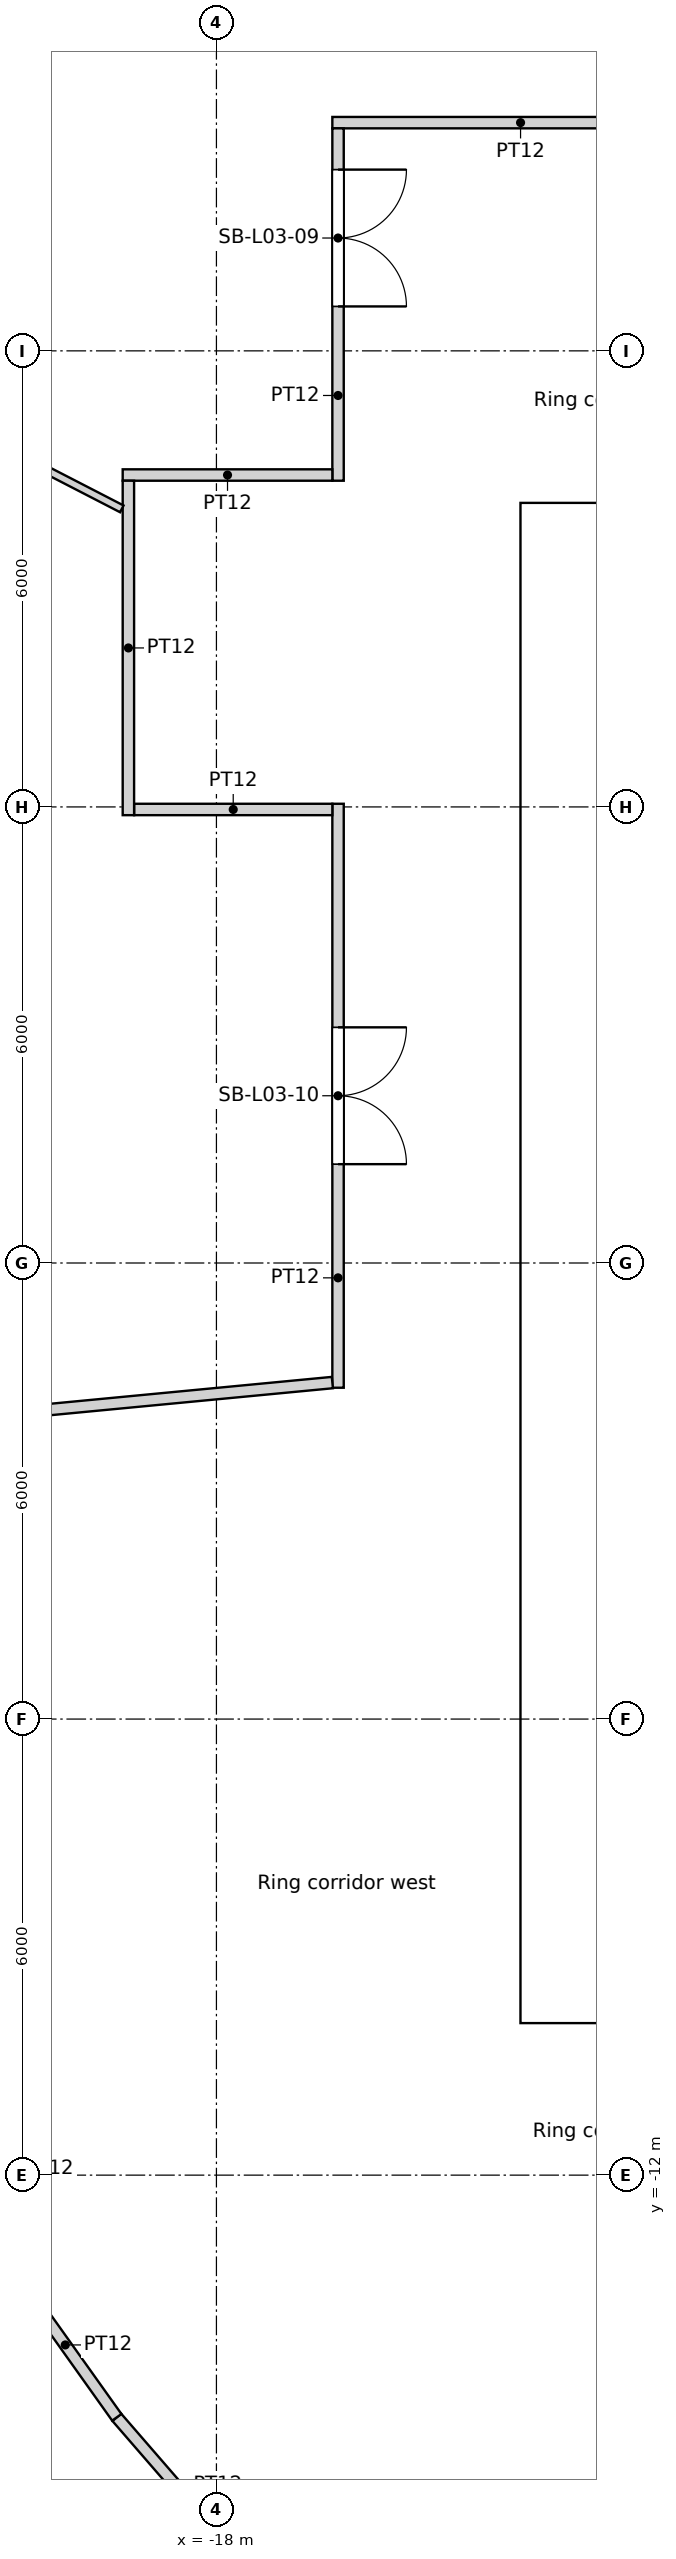
"""IFC4 building model, lengths in metres.
Left out: names, types, materials, properties, quantities, classifications, styles, units other than length and angle.
Written with IfcOpenShell. Run it as: python <this file> out.ifc"""

import sys

from ifc_helpers import new_model, si_unit, direction, frame, frame_2d, origin, origin_2d, place, context, subcontext, project, spatial, rectangle, circle, extrude, element, fill, save


model = new_model("IFC4")
c1 = context("Model", 3, precision=1e-05, world=origin(), true_north=direction((0.0, 1.0)))
c2 = subcontext(c1, "Body", "Model", "MODEL_VIEW")
j1 = project(units=[si_unit("LENGTHUNIT", "METRE"), si_unit("PLANEANGLEUNIT", "RADIAN")], contexts=[c1])
p1 = place(None, origin())
s1 = spatial("IfcSite", under=j1, at=p1, CompositionType="ELEMENT")
p2 = place(p1, origin())
s2 = spatial("IfcBuilding", under=s1, at=p2, CompositionType="ELEMENT")
p3 = place(p2, frame((0.0, 0.0, 18.6)))
s3 = spatial("IfcBuildingStorey", under=s2, at=p3, CompositionType="ELEMENT", Elevation=18.6)
for number, where, z_axis, x_axis in (
    (1, (-20.509, 13.489, 0.0), (0.0, 0.0, 1.0), (1.0, 0.0, 0.0)),
    (2, (-20.509, -13.489, 0.0), (0.0, 0.0, 1.0), (1.0, 0.0, 0.0)),
):
    element("IfcColumn", number, at=place(p3, frame(where, z_axis=z_axis, x_axis=x_axis)), inside=s3, PredefinedType="COLUMN", context=c2, shape_type="SweptSolid", body=[
        extrude(circle(Radius=0.75, at=origin_2d()), origin(), (0.0, 0.0, 1.0), 4.8),
    ])
for number, where, z_axis, x_axis in (
    (3, (-13.798, 12.802, 0.0), (0.0, 0.0, 1.0), (1.0, 0.0, 0.0)),
    (4, (-16.958, 8.167, 0.0), (0.0, 0.0, 1.0), (1.0, 0.0, 0.0)),
    (5, (-18.612, 2.805, 0.0), (0.0, 0.0, 1.0), (1.0, 0.0, 0.0)),
    (6, (-18.612, -2.805, 0.0), (0.0, 0.0, 1.0), (1.0, 0.0, 0.0)),
    (7, (-16.958, -8.167, 0.0), (0.0, 0.0, 1.0), (1.0, 0.0, 0.0)),
    (8, (-13.798, -12.802, 0.0), (0.0, 0.0, 1.0), (1.0, 0.0, 0.0)),
):
    element("IfcColumn", number, at=place(p3, frame(where, z_axis=z_axis, x_axis=x_axis)), inside=s3, PredefinedType="COLUMN", context=c2, shape_type="SweptSolid", body=[
        extrude(circle(Radius=0.8, at=origin_2d()), origin(), (0.0, 0.0, 1.0), 4.8),
    ])
p4 = place(p3, frame((-14.0, -9.4, 0.0), z_axis=(0.0, 0.0, 1.0), x_axis=(1.0, 0.0, 0.0)))
e9 = element("IfcWall", 9, at=p4, inside=s3, PredefinedType="SOLIDWALL", context=c2, shape_type="SweptSolid", body=[
    extrude(rectangle(XDim=28.0, YDim=1.2, at=frame_2d((14.0, 0.0))), origin(), (0.0, 0.0, 1.0), 4.8),
])
p5 = place(p4, frame((14.9, 0.0, 0.0)))
e10 = element("IfcOpeningElement", 10, at=p5, cuts=e9, PredefinedType="OPENING", context=c2, shape_type="SweptSolid", body=[
    extrude(rectangle(XDim=1.0, YDim=2.1, at=frame_2d((0.5, 1.05))), frame((0.0, 0.6, 0.0), z_axis=(0.0, -1.0, 0.0), x_axis=(1.0, 0.0, 0.0)), (0.0, 0.0, 1.0), 1.2),
])
p6 = place(p4, frame((9.8, 0.0, 0.0)))
e11 = element("IfcOpeningElement", 11, at=p6, cuts=e9, PredefinedType="OPENING", context=c2, shape_type="SweptSolid", body=[
    extrude(rectangle(XDim=1.8, YDim=2.1, at=frame_2d((0.9, 1.05))), frame((0.0, 0.6, 0.0), z_axis=(0.0, -1.0, 0.0), x_axis=(1.0, 0.0, 0.0)), (0.0, 0.0, 1.0), 1.2),
])
p7 = place(p4, frame((16.4, 0.0, 0.0)))
e12 = element("IfcOpeningElement", 12, at=p7, cuts=e9, PredefinedType="OPENING", context=c2, shape_type="SweptSolid", body=[
    extrude(rectangle(XDim=1.8, YDim=2.1, at=frame_2d((0.9, 1.05))), frame((0.0, 0.6, 0.0), z_axis=(0.0, -1.0, 0.0), x_axis=(1.0, 0.0, 0.0)), (0.0, 0.0, 1.0), 1.2),
])
p8 = place(p3, frame((-14.0, 9.4, 0.0), z_axis=(0.0, 0.0, 1.0), x_axis=(1.0, 0.0, 0.0)))
e13 = element("IfcWall", 13, at=p8, inside=s3, PredefinedType="SOLIDWALL", context=c2, shape_type="SweptSolid", body=[
    extrude(rectangle(XDim=28.0, YDim=1.2, at=frame_2d((14.0, 0.0))), origin(), (0.0, 0.0, 1.0), 4.8),
])
p9 = place(p8, frame((9.8, 0.0, 0.0)))
e14 = element("IfcOpeningElement", 14, at=p9, cuts=e13, PredefinedType="OPENING", context=c2, shape_type="SweptSolid", body=[
    extrude(rectangle(XDim=1.8, YDim=2.1, at=frame_2d((0.9, 1.05))), frame((0.0, 0.6, 0.0), z_axis=(0.0, -1.0, 0.0), x_axis=(1.0, 0.0, 0.0)), (0.0, 0.0, 1.0), 1.2),
])
p10 = place(p3, frame((-13.4, -8.8, 0.0), z_axis=(0.0, 0.0, 1.0), x_axis=(0.0, 1.0, 0.0)))
e15 = element("IfcWall", 15, at=p10, inside=s3, PredefinedType="SOLIDWALL", context=c2, shape_type="SweptSolid", body=[
    extrude(rectangle(XDim=17.6, YDim=1.2, at=frame_2d((8.8, 0.0))), origin(), (0.0, 0.0, 1.0), 4.8),
])
p11 = place(p10, frame((5.2, 0.0, 0.0)))
e16 = element("IfcOpeningElement", 16, at=p11, cuts=e15, PredefinedType="OPENING", context=c2, shape_type="SweptSolid", body=[
    extrude(rectangle(XDim=1.0, YDim=2.1, at=frame_2d((0.5, 1.05))), frame((0.0, 0.6, 0.0), z_axis=(0.0, -1.0, 0.0), x_axis=(1.0, 0.0, 0.0)), (0.0, 0.0, 1.0), 1.2),
])
p12 = place(p10, frame((11.4, 0.0, 0.0)))
e17 = element("IfcOpeningElement", 17, at=p12, cuts=e15, PredefinedType="OPENING", context=c2, shape_type="SweptSolid", body=[
    extrude(rectangle(XDim=1.0, YDim=2.1, at=frame_2d((0.5, 1.05))), frame((0.0, 0.6, 0.0), z_axis=(0.0, -1.0, 0.0), x_axis=(1.0, 0.0, 0.0)), (0.0, 0.0, 1.0), 1.2),
])
p13 = place(p3, frame((-27.753, 14.308, 0.0), z_axis=(0.0, 0.0, 1.0), x_axis=(0.888834817613, -0.458227745776, 0.0)))
e18 = element("IfcWall", 18, at=p13, inside=s3, PredefinedType="PARTITIONING", context=c2, shape_type="SweptSolid", body=[
    extrude(rectangle(XDim=9.573, YDim=0.1, at=frame_2d((4.786, 0.0))), origin(), (0.0, 0.0, 1.0), 3.75),
])
p14 = place(p3, frame((-24.456, -2.335, 0.0), z_axis=(0.0, 0.0, 1.0), x_axis=(0.995470529319, 0.095070632993, 0.0)))
e19 = element("IfcWall", 19, at=p14, inside=s3, PredefinedType="PARTITIONING", context=c2, shape_type="SweptSolid", body=[
    extrude(rectangle(XDim=8.017, YDim=0.15, at=frame_2d((4.009, 0.0))), origin(), (0.0, 0.0, 1.0), 3.75),
])
p15 = place(p3, frame((-20.667, -13.282, 0.0), z_axis=(0.0, 0.0, 1.0), x_axis=(0.580032319147, -0.814593462252, 0.0)))
e20 = element("IfcWall", 20, at=p15, inside=s3, PredefinedType="PARTITIONING", context=c2, shape_type="SweptSolid", body=[
    extrude(rectangle(XDim=2.338, YDim=0.15, at=frame_2d((1.169, 0.0))), origin(), (0.0, 0.0, 1.0), 3.75),
])
p16 = place(p3, frame((-19.311, -15.186, 0.0), z_axis=(0.0, 0.0, 1.0), x_axis=(0.654866925236, -0.755744209526, 0.0)))
e21 = element("IfcWall", 21, at=p16, inside=s3, PredefinedType="PARTITIONING", context=c2, shape_type="SweptSolid", body=[
    extrude(rectangle(XDim=2.338, YDim=0.15, at=frame_2d((1.169, 0.0))), origin(), (0.0, 0.0, 1.0), 3.75),
])
p17 = place(p3, frame((-19.083, 5.967, 0.0), z_axis=(0.0, 0.0, 1.0), x_axis=(1.0, 0.0, 0.0)))
e22 = element("IfcWall", 22, at=p17, inside=s3, PredefinedType="PARTITIONING", context=c2, shape_type="SweptSolid", body=[
    extrude(rectangle(XDim=2.608, YDim=0.15, at=frame_2d((1.304, 0.0))), origin(), (0.0, 0.0, 1.0), 3.75),
])
p18 = place(p3, frame((-19.158, 10.292, 0.0), z_axis=(0.0, 0.0, 1.0), x_axis=(0.0, -1.0, 0.0)))
e23 = element("IfcWall", 23, at=p18, inside=s3, PredefinedType="PARTITIONING", context=c2, shape_type="SweptSolid", body=[
    extrude(rectangle(XDim=4.4, YDim=0.15, at=frame_2d((2.2, 0.0))), origin(), (0.0, 0.0, 1.0), 3.75),
])
p19 = place(p3, frame((-16.4, -1.641, 0.0), z_axis=(0.0, 0.0, 1.0), x_axis=(0.0, 1.0, 0.0)))
e24 = element("IfcWall", 24, at=p19, inside=s3, PredefinedType="PARTITIONING", context=c2, shape_type="SweptSolid", body=[
    extrude(rectangle(XDim=7.683, YDim=0.15, at=frame_2d((3.841, 0.0))), origin(), (0.0, 0.0, 1.0), 3.75),
])
p20 = place(p19, frame((2.941, 0.0, 0.0)))
e25 = element("IfcOpeningElement", 25, at=p20, cuts=e24, PredefinedType="OPENING", context=c2, shape_type="SweptSolid", body=[
    extrude(rectangle(XDim=1.8, YDim=2.4, at=frame_2d((0.9, 1.2))), frame((0.0, 0.075, 0.0), z_axis=(0.0, -1.0, 0.0), x_axis=(1.0, 0.0, 0.0)), (0.0, 0.0, 1.0), 0.15),
])
p21 = place(p3, frame((-16.475, 10.367, 0.0), z_axis=(0.0, 0.0, 1.0), x_axis=(-1.0, 0.0, 0.0)))
e26 = element("IfcWall", 26, at=p21, inside=s3, PredefinedType="PARTITIONING", context=c2, shape_type="SweptSolid", body=[
    extrude(rectangle(XDim=2.758, YDim=0.15, at=frame_2d((1.379, 0.0))), origin(), (0.0, 0.0, 1.0), 3.75),
])
p22 = place(p3, frame((-16.4, 10.292, 0.0), z_axis=(0.0, 0.0, 1.0), x_axis=(0.0, 1.0, 0.0)))
e27 = element("IfcWall", 27, at=p22, inside=s3, PredefinedType="PARTITIONING", context=c2, shape_type="SweptSolid", body=[
    extrude(rectangle(XDim=4.636, YDim=0.15, at=frame_2d((2.318, 0.0))), origin(), (0.0, 0.0, 1.0), 3.75),
])
p23 = place(p22, frame((2.293, 0.0, 0.0)))
e28 = element("IfcOpeningElement", 28, at=p23, cuts=e27, PredefinedType="OPENING", context=c2, shape_type="SweptSolid", body=[
    extrude(rectangle(XDim=1.8, YDim=2.4, at=frame_2d((0.9, 1.2))), frame((0.0, 0.075, 0.0), z_axis=(0.0, -1.0, 0.0), x_axis=(1.0, 0.0, 0.0)), (0.0, 0.0, 1.0), 0.15),
])
p24 = place(p3, frame((-11.523, 15.002, 0.0), z_axis=(0.0, 0.0, 1.0), x_axis=(-1.0, 0.0, 0.0)))
e29 = element("IfcWall", 29, at=p24, inside=s3, PredefinedType="PARTITIONING", context=c2, shape_type="SweptSolid", body=[
    extrude(rectangle(XDim=4.952, YDim=0.15, at=frame_2d((2.476, 0.0))), origin(), (0.0, 0.0, 1.0), 3.75),
])
p25 = place(p11, origin())
e30 = element("IfcDoor", 30, at=p25, inside=s3, OperationType="DOUBLE_DOOR_SINGLE_SWING", PredefinedType="DOOR", context=c2, shape_type="SweptSolid", body=[
    extrude(rectangle(XDim=1.0, YDim=2.1, at=frame_2d((0.5, 1.05))), frame((0.0, 0.025, 0.0), z_axis=(0.0, -1.0, 0.0), x_axis=(1.0, 0.0, 0.0)), (0.0, 0.0, 1.0), 0.05),
])
fill(e16, e30)
p26 = place(p12, origin())
e31 = element("IfcDoor", 31, at=p26, inside=s3, OperationType="DOUBLE_DOOR_SINGLE_SWING", PredefinedType="DOOR", context=c2, shape_type="SweptSolid", body=[
    extrude(rectangle(XDim=1.0, YDim=2.1, at=frame_2d((0.5, 1.05))), frame((0.0, 0.025, 0.0), z_axis=(0.0, -1.0, 0.0), x_axis=(1.0, 0.0, 0.0)), (0.0, 0.0, 1.0), 0.05),
])
fill(e17, e31)
p27 = place(p23, origin())
e32 = element("IfcDoor", 32, at=p27, inside=s3, OperationType="DOUBLE_DOOR_SINGLE_SWING", PredefinedType="DOOR", context=c2, shape_type="SweptSolid", body=[
    extrude(rectangle(XDim=1.8, YDim=2.4, at=frame_2d((0.9, 1.2))), frame((0.0, 0.025, 0.0), z_axis=(0.0, -1.0, 0.0), x_axis=(1.0, 0.0, 0.0)), (0.0, 0.0, 1.0), 0.05),
])
fill(e28, e32)
p28 = place(p20, origin())
e33 = element("IfcDoor", 33, at=p28, inside=s3, OperationType="DOUBLE_DOOR_SINGLE_SWING", PredefinedType="DOOR", context=c2, shape_type="SweptSolid", body=[
    extrude(rectangle(XDim=1.8, YDim=2.4, at=frame_2d((0.9, 1.2))), frame((0.0, 0.025, 0.0), z_axis=(0.0, -1.0, 0.0), x_axis=(1.0, 0.0, 0.0)), (0.0, 0.0, 1.0), 0.05),
])
fill(e25, e33)
save(model, sys.argv[1])
